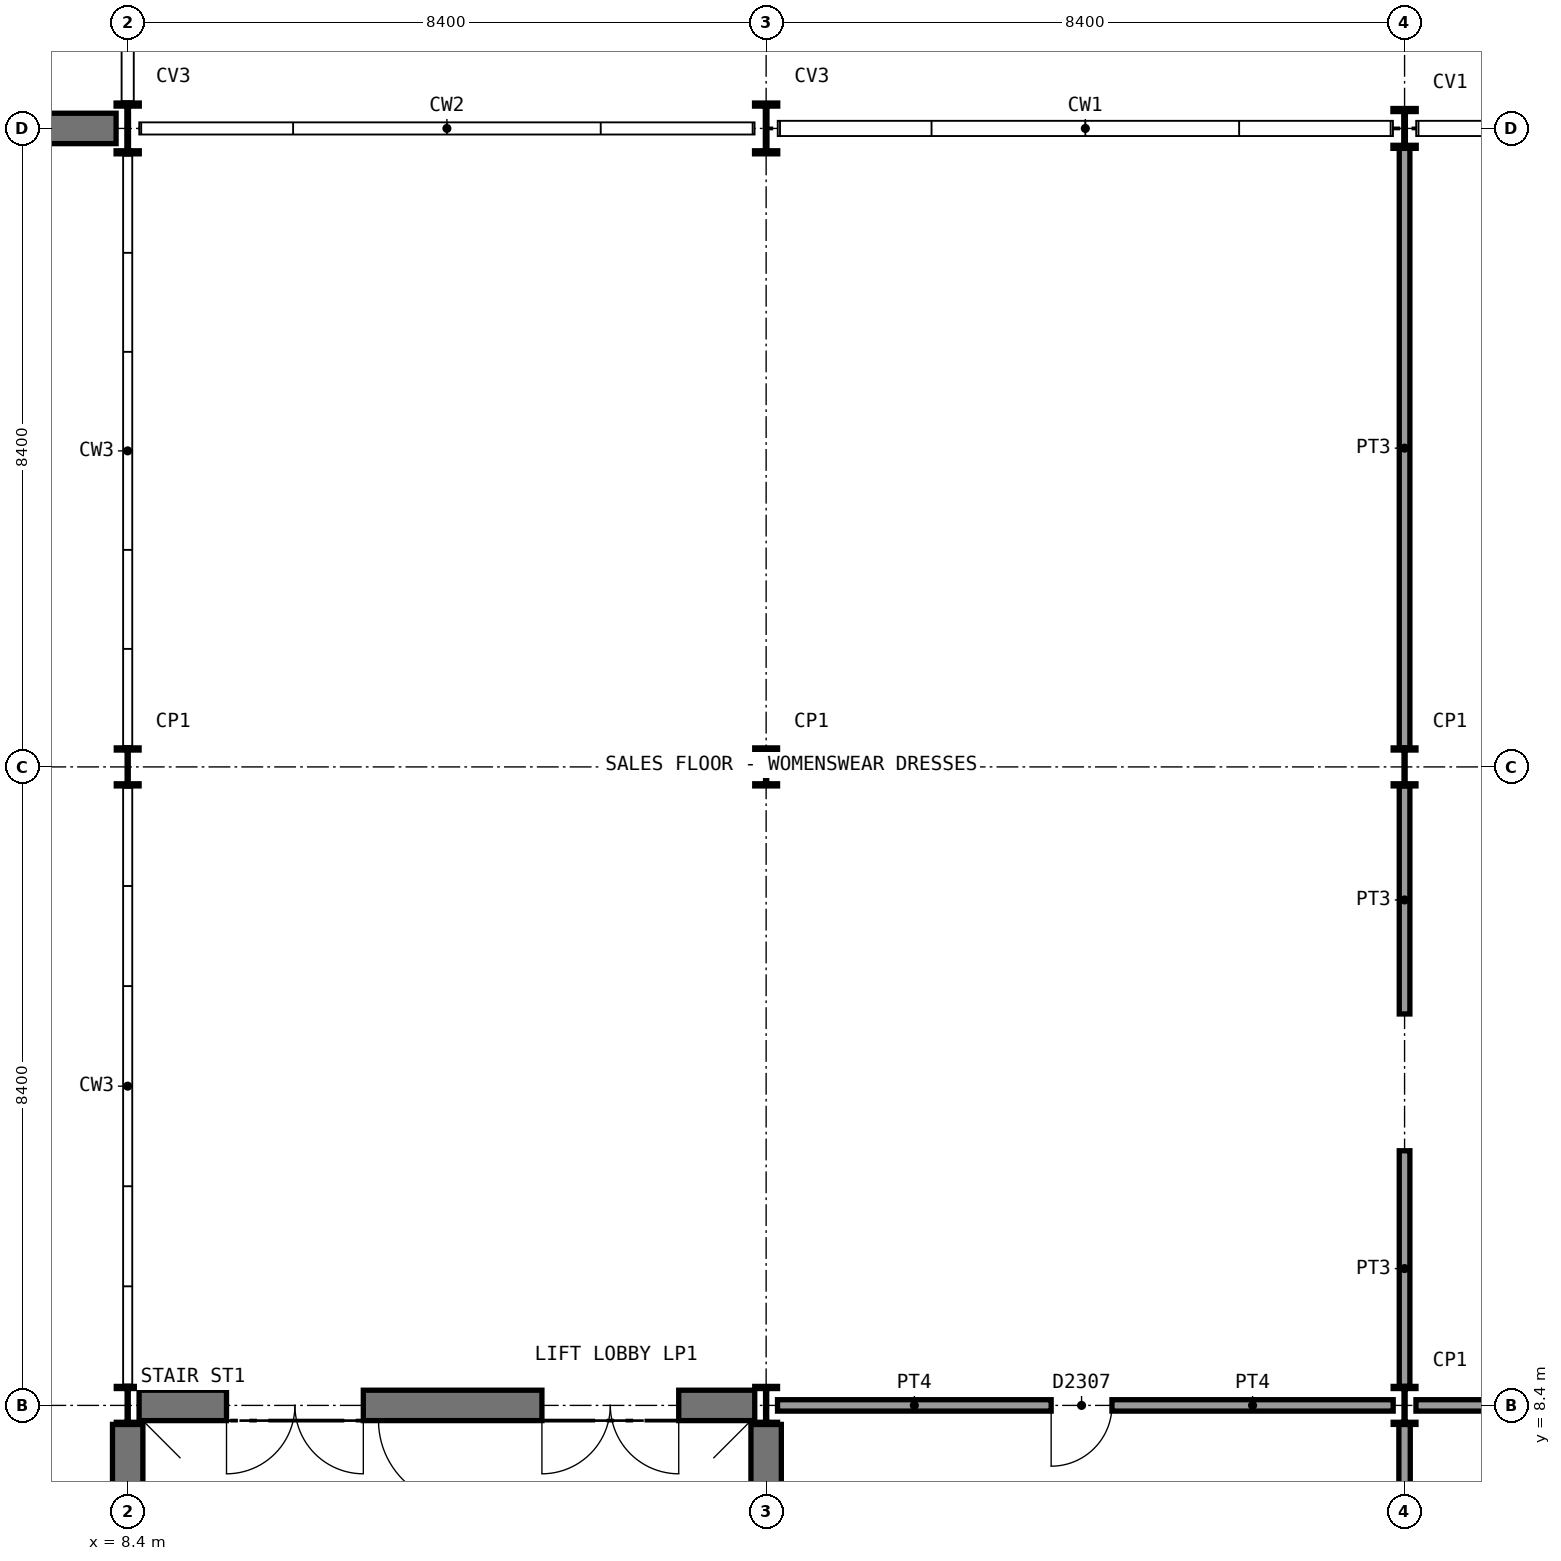
"""IFC4 building model, lengths in metres.
Left out: names, types, materials, properties, quantities, classifications, styles, units other than length and angle.
Written with IfcOpenShell. Run it as: python <this file> out.ifc"""

import sys

from ifc_helpers import new_model, si_unit, direction, frame, frame_2d, origin, origin_2d, place, context, subcontext, project, spatial, rectangle, i_section, extrude, element, fill, save


model = new_model("IFC4")
c1 = context("Model", 3, precision=1e-05, world=origin(), true_north=direction((0.0, 1.0)))
c2 = subcontext(c1, "Body", "Model", "MODEL_VIEW")
j1 = project(units=[si_unit("LENGTHUNIT", "METRE"), si_unit("PLANEANGLEUNIT", "RADIAN")], contexts=[c1])
p1 = place(None, origin())
s1 = spatial("IfcSite", under=j1, at=p1, CompositionType="ELEMENT")
p2 = place(p1, origin())
s2 = spatial("IfcBuilding", under=s1, at=p2, CompositionType="ELEMENT")
p3 = place(p2, frame((0.0, 0.0, 6.0)))
s3 = spatial("IfcBuildingStorey", under=s2, at=p3, CompositionType="ELEMENT", Elevation=6.0)
p4 = place(p3, frame((8.55, 8.4, 0.0), z_axis=(0.0, 0.0, 1.0), x_axis=(1.0, 0.0, 0.0)))
e1 = element("IfcWall", 1, at=p4, inside=s3, PredefinedType="SHEAR", context=c2, shape_type="SweptSolid", body=[
    extrude(rectangle(XDim=8.1, YDim=0.4, at=frame_2d((4.05, 0.0))), origin(), (0.0, 0.0, 1.0), 5.25),
])
p5 = place(p4, frame((1.15, 0.0, 0.0)))
e2 = element("IfcOpeningElement", 2, at=p5, cuts=e1, PredefinedType="OPENING", context=c2, shape_type="SweptSolid", body=[
    extrude(rectangle(XDim=1.8, YDim=2.1, at=frame_2d((0.9, 1.05))), frame((0.0, 0.21, 0.0), z_axis=(0.0, -1.0, 0.0), x_axis=(1.0, 0.0, 0.0)), (0.0, 0.0, 1.0), 0.42),
])
p6 = place(p4, frame((5.3, 0.0, 0.0)))
e3 = element("IfcOpeningElement", 3, at=p6, cuts=e1, PredefinedType="OPENING", context=c2, shape_type="SweptSolid", body=[
    extrude(rectangle(XDim=1.8, YDim=2.1, at=frame_2d((0.9, 1.05))), frame((0.0, 0.21, 0.0), z_axis=(0.0, -1.0, 0.0), x_axis=(1.0, 0.0, 0.0)), (0.0, 0.0, 1.0), 0.42),
])
for number, where, z_axis, x_axis in (
    (4, (8.4, 0.25, 0.0), (0.0, 0.0, 1.0), (0.0, 1.0, 0.0)),
    (5, (16.8, 0.25, 0.0), (0.0, 0.0, 1.0), (0.0, 1.0, 0.0)),
):
    element("IfcWall", number, at=place(p3, frame(where, z_axis=z_axis, x_axis=x_axis)), inside=s3, PredefinedType="SHEAR", context=c2, shape_type="SweptSolid", body=[
        extrude(rectangle(XDim=7.9, YDim=0.4, at=frame_2d((3.95, 0.0))), origin(), (0.0, 0.0, 1.0), 5.25),
    ])
for number, where, z_axis, x_axis in (
    (6, (8.4, 8.4, 0.0), (0.0, 0.0, 1.0), (1.0, 0.0, 0.0)),
    (7, (8.4, 16.8, 0.0), (0.0, 0.0, 1.0), (1.0, 0.0, 0.0)),
):
    element("IfcColumn", number, at=place(p3, frame(where, z_axis=z_axis, x_axis=x_axis)), inside=s3, PredefinedType="COLUMN", context=c2, shape_type="SweptSolid", body=[
        extrude(i_section(OverallWidth=0.3, OverallDepth=0.5, WebThickness=0.014, FlangeThickness=0.028, FilletRadius=0.027, at=origin_2d()), origin(), (0.0, 0.0, 1.0), 5.4),
    ])
p7 = place(p3, frame((8.4, 25.2, 0.0), z_axis=(0.0, 0.0, 1.0), x_axis=(1.0, 0.0, 0.0)))
e8 = element("IfcColumn", 8, at=p7, inside=s3, PredefinedType="COLUMN", context=c2, shape_type="SweptSolid", body=[
    extrude(i_section(OverallWidth=0.305, OverallDepth=0.668, WebThickness=0.021, FlangeThickness=0.04, FilletRadius=0.027, at=origin_2d()), origin(), (0.0, 0.0, 1.0), 5.4),
])
for number, where, z_axis, x_axis in (
    (9, (16.8, 8.4, 0.0), (0.0, 0.0, 1.0), (1.0, 0.0, 0.0)),
    (10, (16.8, 16.8, 0.0), (0.0, 0.0, 1.0), (1.0, 0.0, 0.0)),
):
    element("IfcColumn", number, at=place(p3, frame(where, z_axis=z_axis, x_axis=x_axis)), inside=s3, PredefinedType="COLUMN", context=c2, shape_type="SweptSolid", body=[
        extrude(i_section(OverallWidth=0.3, OverallDepth=0.5, WebThickness=0.014, FlangeThickness=0.028, FilletRadius=0.027, at=origin_2d()), origin(), (0.0, 0.0, 1.0), 5.4),
    ])
p8 = place(p3, frame((16.8, 25.2, 0.0), z_axis=(0.0, 0.0, 1.0), x_axis=(1.0, 0.0, 0.0)))
e11 = element("IfcColumn", 11, at=p8, inside=s3, PredefinedType="COLUMN", context=c2, shape_type="SweptSolid", body=[
    extrude(i_section(OverallWidth=0.305, OverallDepth=0.668, WebThickness=0.021, FlangeThickness=0.04, FilletRadius=0.027, at=origin_2d()), origin(), (0.0, 0.0, 1.0), 5.4),
])
for number, where, z_axis, x_axis in (
    (12, (25.2, 8.4, 0.0), (0.0, 0.0, 1.0), (1.0, 0.0, 0.0)),
    (13, (25.2, 16.8, 0.0), (0.0, 0.0, 1.0), (1.0, 0.0, 0.0)),
):
    element("IfcColumn", number, at=place(p3, frame(where, z_axis=z_axis, x_axis=x_axis)), inside=s3, PredefinedType="COLUMN", context=c2, shape_type="SweptSolid", body=[
        extrude(i_section(OverallWidth=0.3, OverallDepth=0.5, WebThickness=0.014, FlangeThickness=0.028, FilletRadius=0.027, at=origin_2d()), origin(), (0.0, 0.0, 1.0), 5.4),
    ])
p9 = place(p3, frame((25.2, 25.2, 0.0), z_axis=(0.0, 0.0, 1.0), x_axis=(1.0, 0.0, 0.0)))
e14 = element("IfcColumn", 14, at=p9, inside=s3, PredefinedType="COLUMN", context=c2, shape_type="SweptSolid", body=[
    extrude(i_section(OverallWidth=0.306, OverallDepth=0.524, WebThickness=0.021, FlangeThickness=0.04, FilletRadius=0.027, at=origin_2d()), origin(), (0.0, 0.0, 1.0), 5.4),
])
p10 = place(p3, frame((25.2, 0.25, 0.0), z_axis=(0.0, 0.0, 1.0), x_axis=(0.0, 1.0, 0.0)))
e15 = element("IfcWall", 15, at=p10, inside=s3, PredefinedType="SOLIDWALL", context=c2, shape_type="SweptSolid", body=[
    extrude(rectangle(XDim=7.9, YDim=0.15, at=frame_2d((3.95, 0.0))), origin(), (0.0, 0.0, 1.0), 4.81),
])
p11 = place(p3, frame((16.95, 8.4, 0.0), z_axis=(0.0, 0.0, 1.0), x_axis=(1.0, 0.0, 0.0)))
e16 = element("IfcWall", 16, at=p11, inside=s3, PredefinedType="SOLIDWALL", context=c2, shape_type="SweptSolid", body=[
    extrude(rectangle(XDim=8.1, YDim=0.15, at=frame_2d((4.05, 0.0))), origin(), (0.0, 0.0, 1.0), 4.92),
])
p12 = place(p11, frame((3.6, 0.0, 0.0)))
e17 = element("IfcOpeningElement", 17, at=p12, cuts=e16, PredefinedType="OPENING", context=c2, shape_type="SweptSolid", body=[
    extrude(rectangle(XDim=0.8, YDim=2.1, at=frame_2d((0.4, 1.05))), frame((0.0, 0.085, 0.0), z_axis=(0.0, -1.0, 0.0), x_axis=(1.0, 0.0, 0.0)), (0.0, 0.0, 1.0), 0.17),
])
p13 = place(p3, frame((25.35, 8.4, 0.0), z_axis=(0.0, 0.0, 1.0), x_axis=(1.0, 0.0, 0.0)))
e18 = element("IfcWall", 18, at=p13, inside=s3, PredefinedType="SOLIDWALL", context=c2, shape_type="SweptSolid", body=[
    extrude(rectangle(XDim=8.1, YDim=0.15, at=frame_2d((4.05, 0.0))), origin(), (0.0, 0.0, 1.0), 4.92),
])
p14 = place(p13, frame((3.35, 0.0, 0.0)))
e19 = element("IfcOpeningElement", 19, at=p14, cuts=e18, PredefinedType="OPENING", context=c2, shape_type="SweptSolid", body=[
    extrude(rectangle(XDim=1.5, YDim=2.1, at=frame_2d((0.75, 1.05))), frame((0.0, 0.085, 0.0), z_axis=(0.0, -1.0, 0.0), x_axis=(1.0, 0.0, 0.0)), (0.0, 0.0, 1.0), 0.17),
])
p15 = place(p3, frame((25.2, 8.65, 0.0), z_axis=(0.0, 0.0, 1.0), x_axis=(0.0, 1.0, 0.0)))
e20 = element("IfcWall", 20, at=p15, inside=s3, PredefinedType="PARTITIONING", context=c2, shape_type="SweptSolid", body=[
    extrude(rectangle(XDim=3.1, YDim=0.14, at=frame_2d((1.55, 0.0))), origin(), (0.0, 0.0, 1.0), 4.81),
])
p16 = place(p3, frame((25.2, 13.55, 0.0), z_axis=(0.0, 0.0, 1.0), x_axis=(0.0, 1.0, 0.0)))
e21 = element("IfcWall", 21, at=p16, inside=s3, PredefinedType="PARTITIONING", context=c2, shape_type="SweptSolid", body=[
    extrude(rectangle(XDim=3.0, YDim=0.14, at=frame_2d((1.5, 0.0))), origin(), (0.0, 0.0, 1.0), 4.81),
])
p17 = place(p3, frame((25.2, 17.05, 0.0), z_axis=(0.0, 0.0, 1.0), x_axis=(0.0, 1.0, 0.0)))
e22 = element("IfcWall", 22, at=p17, inside=s3, PredefinedType="PARTITIONING", context=c2, shape_type="SweptSolid", body=[
    extrude(rectangle(XDim=7.888, YDim=0.14, at=frame_2d((3.944, 0.0))), origin(), (0.0, 0.0, 1.0), 4.81),
])
p18 = place(p3, frame((0.305, 25.2, 0.0), z_axis=(0.0, 0.0, 1.0), x_axis=(1.0, 0.0, 0.0)))
e23 = element("IfcWall", 23, at=p18, inside=s3, PredefinedType="STANDARD", context=c2, shape_type="SweptSolid", body=[
    extrude(rectangle(XDim=7.942, YDim=0.4, at=frame_2d((3.971, 0.0))), origin(), (0.0, 0.0, 1.0), 5.25),
])
p19 = place(p3, frame((12.8, 0.2, 0.0), z_axis=(0.0, 0.0, 1.0), x_axis=(0.0, 1.0, 0.0)))
e24 = element("IfcWall", 24, at=p19, inside=s3, PredefinedType="SHEAR", context=c2, shape_type="SweptSolid", body=[
    extrude(rectangle(XDim=8.0, YDim=0.2, at=frame_2d((4.0, 0.0))), origin(), (0.0, 0.0, 1.0), 5.25),
])
p20 = place(p19, frame((6.9, 0.0, 0.0)))
e25 = element("IfcOpeningElement", 25, at=p20, cuts=e24, PredefinedType="OPENING", context=c2, shape_type="SweptSolid", body=[
    extrude(rectangle(XDim=1.11, YDim=2.1, at=frame_2d((0.555, 1.05))), frame((0.0, 0.11, 0.0), z_axis=(0.0, -1.0, 0.0), x_axis=(1.0, 0.0, 0.0)), (0.0, 0.0, 1.0), 0.22),
])
p21 = place(p12, frame((0.8, 0.0, 0.0), z_axis=(0.0, 0.0, 1.0), x_axis=(-1.0, 0.0, 0.0)))
e26 = element("IfcDoor", 26, at=p21, inside=s3, OperationType="SINGLE_SWING_RIGHT", PredefinedType="DOOR", context=c2, shape_type="SweptSolid", body=[
    extrude(rectangle(XDim=0.8, YDim=2.1, at=frame_2d((0.4, 1.05))), frame((0.0, 0.025, 0.0), z_axis=(0.0, -1.0, 0.0), x_axis=(1.0, 0.0, 0.0)), (0.0, 0.0, 1.0), 0.05),
])
fill(e17, e26)
p22 = place(p20, origin())
e27 = element("IfcDoor", 27, at=p22, inside=s3, OperationType="SINGLE_SWING_RIGHT", PredefinedType="DOOR", context=c2, shape_type="SweptSolid", body=[
    extrude(rectangle(XDim=1.1, YDim=2.1, at=frame_2d((0.55, 1.05))), frame((0.0, 0.025, 0.0), z_axis=(0.0, -1.0, 0.0), x_axis=(1.0, 0.0, 0.0)), (0.0, 0.0, 1.0), 0.05),
])
fill(e25, e27)
p23 = place(p5, frame((1.8, 0.0, 0.0), z_axis=(0.0, 0.0, 1.0), x_axis=(-1.0, 0.0, 0.0)))
e28 = element("IfcDoor", 28, at=p23, inside=s3, OperationType="DOUBLE_DOOR_SINGLE_SWING", PredefinedType="DOOR", context=c2, shape_type="SweptSolid", body=[
    extrude(rectangle(XDim=1.8, YDim=2.1, at=frame_2d((0.9, 1.05))), frame((0.0, 0.025, 0.0), z_axis=(0.0, -1.0, 0.0), x_axis=(1.0, 0.0, 0.0)), (0.0, 0.0, 1.0), 0.05),
])
fill(e2, e28)
p24 = place(p6, frame((1.8, 0.0, 0.0), z_axis=(0.0, 0.0, 1.0), x_axis=(-1.0, 0.0, 0.0)))
e29 = element("IfcDoor", 29, at=p24, inside=s3, OperationType="DOUBLE_DOOR_SINGLE_SWING", PredefinedType="DOOR", context=c2, shape_type="SweptSolid", body=[
    extrude(rectangle(XDim=1.8, YDim=2.1, at=frame_2d((0.9, 1.05))), frame((0.0, 0.025, 0.0), z_axis=(0.0, -1.0, 0.0), x_axis=(1.0, 0.0, 0.0)), (0.0, 0.0, 1.0), 0.05),
])
fill(e3, e29)
save(model, sys.argv[1])
